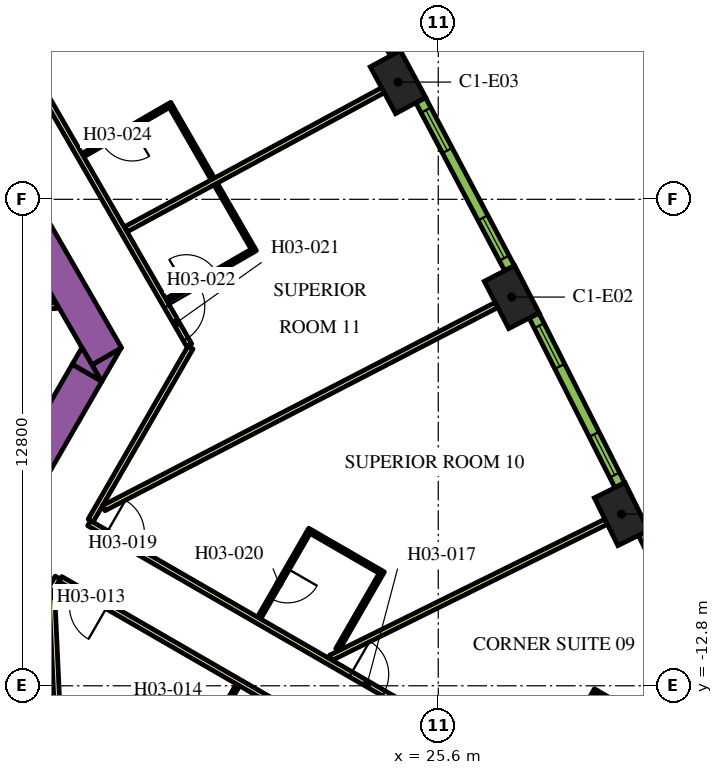
"""IFC4 building model, lengths in metres.
Left out: names, types, materials, properties, quantities, classifications, styles, units other than length and angle.
Written with IfcOpenShell. Run it as: python <this file> out.ifc"""

import sys

from ifc_helpers import new_model, si_unit, direction, frame, frame_2d, origin, origin_2d, place, context, subcontext, project, spatial, polyline, rectangle, outline, extrude, element, fill, save


model = new_model("IFC4")
c1 = context("Model", 3, precision=1e-05, world=origin(), true_north=direction((0.0, 1.0)))
c2 = subcontext(c1, "Body", "Model", "MODEL_VIEW")
j1 = project(units=[si_unit("LENGTHUNIT", "METRE"), si_unit("PLANEANGLEUNIT", "RADIAN")], contexts=[c1])
p1 = place(None, origin())
s1 = spatial("IfcSite", under=j1, at=p1, CompositionType="ELEMENT")
p2 = place(p1, origin())
s2 = spatial("IfcBuilding", under=s1, at=p2, CompositionType="ELEMENT")
p3 = place(p2, frame((0.0, 0.0, 58.8)))
s3 = spatial("IfcBuildingStorey", under=s2, at=p3, CompositionType="ELEMENT", Elevation=58.8)
for number, where, z_axis, x_axis in (
    (1, (30.421, -8.284, 0.0), (0.0, 0.0, 1.0), (-0.443, 0.897, 0.0)),
    (2, (27.533, -2.572, 0.0), (0.0, 0.0, 1.0), (-0.459, 0.888, 0.0)),
    (3, (24.54, 3.085, 0.0), (0.0, 0.0, 1.0), (-0.476, 0.88, 0.0)),
):
    element("IfcColumn", number, at=place(p3, frame(where, z_axis=z_axis, x_axis=x_axis)), inside=s3, PredefinedType="COLUMN", context=c2, shape_type="SweptSolid", body=[
        extrude(rectangle(XDim=1.4, YDim=0.9, at=origin_2d()), origin(), (0.0, 0.0, 1.0), 3.9),
    ])
p4 = place(p3, frame((6.776, 13.364, 0.0), z_axis=(0.0, 0.0, 1.0), x_axis=(0.500004177138, -0.8660229921, 0.0)))
e4 = element("IfcWall", 4, at=p4, inside=s3, PredefinedType="SOLIDWALL", context=c2, shape_type="SweptSolid", body=[
    extrude(rectangle(XDim=20.204, YDim=0.9, at=frame_2d((10.102, 0.0))), origin(), (0.0, 0.0, 1.0), 3.9),
])
p5 = place(p3, origin())
e5 = element("IfcWall", 5, at=p5, inside=s3, PredefinedType="SOLIDWALL", context=c2, shape_type="SweptSolid", body=[
    extrude(outline(polyline([(16.743, -4.8), (16.489, -4.36), (17.251, -3.92), (16.743, -4.8)])), origin(), (0.0, 0.0, 1.0), 3.9),
])
p6 = place(p3, frame((11.695, -12.644, 0.0), z_axis=(0.0, 0.0, 1.0), x_axis=(0.500010229568, 0.86601949766, 0.0)))
e6 = element("IfcWall", 6, at=p6, inside=s3, PredefinedType="SOLIDWALL", context=c2, shape_type="SweptSolid", body=[
    extrude(rectangle(XDim=9.326, YDim=0.9, at=frame_2d((4.663, 0.0))), origin(), (0.0, 0.0, 1.0), 3.9),
])
e7 = element("IfcWall", 7, at=p5, inside=s3, PredefinedType="SOLIDWALL", context=c2, shape_type="SweptSolid", body=[
    extrude(outline(polyline([(16.223, -3.9), (16.732, -4.78), (15.969, -4.34), (16.223, -3.9)])), origin(), (0.0, 0.0, 1.0), 3.9),
])
p7 = place(p3, frame((12.915, -2.8, 0.0), z_axis=(0.0, 0.0, 1.0), x_axis=(1.0, 0.0, 0.0)))
e8 = element("IfcWall", 8, at=p7, inside=s3, PredefinedType="PARTITIONING", context=c2, shape_type="SweptSolid", body=[
    extrude(rectangle(XDim=2.637, YDim=0.15, at=frame_2d((1.318, 0.0))), origin(), (0.0, 0.0, 1.0), 2.75),
])
p8 = place(p3, frame((16.412, -8.523, 0.0), z_axis=(0.0, 0.0, 1.0), x_axis=(0.866022197818, -0.500005552856, 0.0)))
e9 = element("IfcWall", 9, at=p8, inside=s3, PredefinedType="PARTITIONING", context=c2, shape_type="SweptSolid", body=[
    extrude(rectangle(XDim=16.224, YDim=0.15, at=frame_2d((8.112, 0.0))), origin(), (0.0, 0.0, 1.0), 2.75),
])
p9 = place(p8, frame((7.949, 0.0, 0.0)))
e10 = element("IfcOpeningElement", 10, at=p9, cuts=e9, PredefinedType="OPENING", context=c2, shape_type="SweptSolid", body=[
    extrude(rectangle(XDim=1.0, YDim=2.1, at=frame_2d((0.5, 1.05))), frame((0.0, 0.085, 0.0), z_axis=(0.0, -1.0, 0.0), x_axis=(1.0, 0.0, 0.0)), (0.0, 0.0, 1.0), 0.17),
])
p10 = place(p8, frame((0.526, 0.0, 0.0)))
e11 = element("IfcOpeningElement", 11, at=p10, cuts=e9, PredefinedType="OPENING", context=c2, shape_type="SweptSolid", body=[
    extrude(rectangle(XDim=1.0, YDim=2.1, at=frame_2d((0.5, 1.05))), frame((0.0, 0.085, 0.0), z_axis=(0.0, -1.0, 0.0), x_axis=(1.0, 0.0, 0.0)), (0.0, 0.0, 1.0), 0.17),
])
p11 = place(p3, frame((19.081, -3.9, 0.0), z_axis=(0.0, 0.0, 1.0), x_axis=(-0.499974327079, -0.866040225545, 0.0)))
e12 = element("IfcWall", 12, at=p11, inside=s3, PredefinedType="PARTITIONING", context=c2, shape_type="SweptSolid", body=[
    extrude(rectangle(XDim=5.258, YDim=0.15, at=frame_2d((2.629, 0.0))), origin(), (0.0, 0.0, 1.0), 2.75),
])
p12 = place(p3, frame((6.163, 18.475, 0.0), z_axis=(0.0, 0.0, 1.0), x_axis=(0.500001317485, -0.866024643133, 0.0)))
e13 = element("IfcWall", 13, at=p12, inside=s3, PredefinedType="PARTITIONING", context=c2, shape_type="SweptSolid", body=[
    extrude(rectangle(XDim=25.767, YDim=0.15, at=frame_2d((12.883, 0.0))), origin(), (0.0, 0.0, 1.0), 2.75),
])
p13 = place(p12, frame((24.586, 0.0, 0.0)))
e14 = element("IfcOpeningElement", 14, at=p13, cuts=e13, PredefinedType="OPENING", context=c2, shape_type="SweptSolid", body=[
    extrude(rectangle(XDim=1.0, YDim=2.1, at=frame_2d((0.5, 1.05))), frame((0.0, 0.085, 0.0), z_axis=(0.0, -1.0, 0.0), x_axis=(1.0, 0.0, 0.0)), (0.0, 0.0, 1.0), 0.17),
])
p14 = place(p12, frame((13.144, 0.0, 0.0)))
e15 = element("IfcOpeningElement", 15, at=p14, cuts=e13, PredefinedType="OPENING", context=c2, shape_type="SweptSolid", body=[
    extrude(rectangle(XDim=1.0, YDim=2.1, at=frame_2d((0.5, 1.05))), frame((0.0, 0.085, 0.0), z_axis=(0.0, -1.0, 0.0), x_axis=(1.0, 0.0, 0.0)), (0.0, 0.0, 1.0), 0.17),
])
p15 = place(p12, frame((11.692, 0.0, 0.0)))
e16 = element("IfcOpeningElement", 16, at=p15, cuts=e13, PredefinedType="OPENING", context=c2, shape_type="SweptSolid", body=[
    extrude(rectangle(XDim=1.0, YDim=2.1, at=frame_2d((0.5, 1.05))), frame((0.0, 0.085, 0.0), z_axis=(0.0, -1.0, 0.0), x_axis=(1.0, 0.0, 0.0)), (0.0, 0.0, 1.0), 0.17),
])
p16 = place(p12, frame((0.572, 0.0, 0.0)))
e17 = element("IfcOpeningElement", 17, at=p16, cuts=e13, PredefinedType="OPENING", context=c2, shape_type="SweptSolid", body=[
    extrude(rectangle(XDim=1.0, YDim=2.1, at=frame_2d((0.5, 1.05))), frame((0.0, 0.085, 0.0), z_axis=(0.0, -1.0, 0.0), x_axis=(1.0, 0.0, 0.0)), (0.0, 0.0, 1.0), 0.17),
])
p17 = place(p3, frame((15.587, -9.952, 0.0), z_axis=(0.0, 0.0, 1.0), x_axis=(-0.500016618951, -0.866015808616, 0.0)))
e18 = element("IfcWall", 18, at=p17, inside=s3, PredefinedType="PARTITIONING", context=c2, shape_type="SweptSolid", body=[
    extrude(rectangle(XDim=5.268, YDim=0.15, at=frame_2d((2.634, 0.0))), origin(), (0.0, 0.0, 1.0), 2.75),
])
p18 = place(p3, frame((29.638, -18.064, 0.0), z_axis=(0.0, 0.0, 1.0), x_axis=(-0.866026175601, 0.499998663172, 0.0)))
e19 = element("IfcWall", 19, at=p18, inside=s3, PredefinedType="PARTITIONING", context=c2, shape_type="SweptSolid", body=[
    extrude(rectangle(XDim=16.144, YDim=0.15, at=frame_2d((8.072, 0.0))), origin(), (0.0, 0.0, 1.0), 2.75),
])
p19 = place(p18, frame((14.714, 0.0, 0.0)))
e20 = element("IfcOpeningElement", 20, at=p19, cuts=e19, PredefinedType="OPENING", context=c2, shape_type="SweptSolid", body=[
    extrude(rectangle(XDim=1.0, YDim=2.1, at=frame_2d((0.5, 1.05))), frame((0.0, 0.085, 0.0), z_axis=(0.0, -1.0, 0.0), x_axis=(1.0, 0.0, 0.0)), (0.0, 0.0, 1.0), 0.17),
])
p20 = place(p18, frame((7.275, 0.0, 0.0)))
e21 = element("IfcOpeningElement", 21, at=p20, cuts=e19, PredefinedType="OPENING", context=c2, shape_type="SweptSolid", body=[
    extrude(rectangle(XDim=1.0, YDim=2.1, at=frame_2d((0.5, 1.05))), frame((0.0, 0.085, 0.0), z_axis=(0.0, -1.0, 0.0), x_axis=(1.0, 0.0, 0.0)), (0.0, 0.0, 1.0), 0.17),
])
p21 = place(p3, frame((15.973, -22.109, 0.0), z_axis=(0.0, 0.0, 1.0), x_axis=(-0.046191717129, 0.998932592955, 0.0)))
e22 = element("IfcWall", 22, at=p21, inside=s3, PredefinedType="PARTITIONING", context=c2, shape_type="SweptSolid", body=[
    extrude(rectangle(XDim=11.638, YDim=0.15, at=frame_2d((5.819, 0.0))), origin(), (0.0, 0.0, 1.0), 2.75),
])
p22 = place(p3, frame((27.134, -2.779, 0.0), z_axis=(0.0, 0.0, 1.0), x_axis=(-0.8882049501, -0.459447457951, 0.0)))
e23 = element("IfcWall", 23, at=p22, inside=s3, PredefinedType="PARTITIONING", context=c2, shape_type="SweptSolid", body=[
    extrude(rectangle(XDim=11.638, YDim=0.15, at=frame_2d((5.819, 0.0))), origin(), (0.0, 0.0, 1.0), 2.75),
])
p23 = place(p3, frame((24.145, 2.871, 0.0), z_axis=(0.0, 0.0, 1.0), x_axis=(-0.879551725039, -0.475803281809, 0.0)))
e24 = element("IfcWall", 24, at=p23, inside=s3, PredefinedType="PARTITIONING", context=c2, shape_type="SweptSolid", body=[
    extrude(rectangle(XDim=7.688, YDim=0.15, at=frame_2d((3.844, 0.0))), origin(), (0.0, 0.0, 1.0), 2.75),
])
p24 = place(p3, frame((30.018, -8.483, 0.0), z_axis=(0.0, 0.0, 1.0), x_axis=(-0.896544505264, -0.44295366584, 0.0)))
e25 = element("IfcWall", 25, at=p24, inside=s3, PredefinedType="PARTITIONING", context=c2, shape_type="SweptSolid", body=[
    extrude(rectangle(XDim=8.079, YDim=0.15, at=frame_2d((4.04, 0.0))), origin(), (0.0, 0.0, 1.0), 2.75),
])
p25 = place(p3, frame((20.33, -12.777, 0.0), z_axis=(0.0, 0.0, 1.0), x_axis=(-0.500006934395, -0.866021400173, 0.0)))
e26 = element("IfcWall", 26, at=p25, inside=s3, PredefinedType="PARTITIONING", context=c2, shape_type="SweptSolid", body=[
    extrude(rectangle(XDim=2.6, YDim=0.1, at=frame_2d((1.3, 0.0))), origin(), (0.0, 0.0, 1.0), 2.75),
])
p26 = place(p25, frame((0.6, 0.0, 0.0)))
e27 = element("IfcOpeningElement", 27, at=p26, cuts=e26, PredefinedType="OPENING", context=c2, shape_type="SweptSolid", body=[
    extrude(rectangle(XDim=0.9, YDim=2.1, at=frame_2d((0.45, 1.05))), frame((0.0, 0.06, 0.0), z_axis=(0.0, -1.0, 0.0), x_axis=(1.0, 0.0, 0.0)), (0.0, 0.0, 1.0), 0.12),
])
p27 = place(p3, frame((29.752, -12.905, 0.0), z_axis=(0.0, 0.0, 1.0), x_axis=(-0.500049511043, -0.865996816683, 0.0)))
e28 = element("IfcWall", 28, at=p27, inside=s3, PredefinedType="PARTITIONING", context=c2, shape_type="SweptSolid", body=[
    extrude(rectangle(XDim=2.8, YDim=0.1, at=frame_2d((1.4, 0.0))), origin(), (0.0, 0.0, 1.0), 2.75),
])
p28 = place(p27, frame((1.3, 0.0, 0.0)))
e29 = element("IfcOpeningElement", 29, at=p28, cuts=e28, PredefinedType="OPENING", context=c2, shape_type="SweptSolid", body=[
    extrude(rectangle(XDim=0.9, YDim=2.1, at=frame_2d((0.45, 1.05))), frame((0.0, 0.06, 0.0), z_axis=(0.0, -1.0, 0.0), x_axis=(1.0, 0.0, 0.0)), (0.0, 0.0, 1.0), 0.12),
])
p29 = place(p3, frame((29.771, -12.973, 0.0), z_axis=(0.0, 0.0, 1.0), x_axis=(0.865980596518, -0.500077600433, 0.0)))
e30 = element("IfcWall", 30, at=p29, inside=s3, PredefinedType="PARTITIONING", context=c2, shape_type="SweptSolid", body=[
    extrude(rectangle(XDim=2.4, YDim=0.1, at=frame_2d((1.2, 0.0))), origin(), (0.0, 0.0, 1.0), 2.75),
])
p30 = place(p3, frame((22.234, -8.68, 0.0), z_axis=(0.0, 0.0, 1.0), x_axis=(-0.50000943426, -0.866019956843, 0.0)))
e31 = element("IfcWall", 31, at=p30, inside=s3, PredefinedType="PARTITIONING", context=c2, shape_type="SweptSolid", body=[
    extrude(rectangle(XDim=2.7, YDim=0.1, at=frame_2d((1.35, 0.0))), origin(), (0.0, 0.0, 1.0), 2.75),
])
p31 = place(p30, frame((1.2, 0.0, 0.0)))
e32 = element("IfcOpeningElement", 32, at=p31, cuts=e31, PredefinedType="OPENING", context=c2, shape_type="SweptSolid", body=[
    extrude(rectangle(XDim=0.9, YDim=2.1, at=frame_2d((0.45, 1.05))), frame((0.0, 0.06, 0.0), z_axis=(0.0, -1.0, 0.0), x_axis=(1.0, 0.0, 0.0)), (0.0, 0.0, 1.0), 0.12),
])
p32 = place(p3, frame((22.252, -8.748, 0.0), z_axis=(0.0, 0.0, 1.0), x_axis=(0.866009402589, -0.500027713859, 0.0)))
e33 = element("IfcWall", 33, at=p32, inside=s3, PredefinedType="PARTITIONING", context=c2, shape_type="SweptSolid", body=[
    extrude(rectangle(XDim=2.1, YDim=0.1, at=frame_2d((1.05, 0.0))), origin(), (0.0, 0.0, 1.0), 2.75),
])
p33 = place(p3, frame((22.944, -11.85, 0.0), z_axis=(0.0, 0.0, 1.0), x_axis=(0.499940577336, 0.866059708757, 0.0)))
e34 = element("IfcWall", 34, at=p33, inside=s3, PredefinedType="PARTITIONING", context=c2, shape_type="SweptSolid", body=[
    extrude(rectangle(XDim=2.39, YDim=0.1, at=frame_2d((1.195, 0.0))), origin(), (0.0, 0.0, 1.0), 2.75),
])
p34 = place(p3, frame((18.451, -2.657, 0.0), z_axis=(0.0, 0.0, 1.0), x_axis=(0.86599734893, 0.500048589285, 0.0)))
e35 = element("IfcWall", 35, at=p34, inside=s3, PredefinedType="PARTITIONING", context=c2, shape_type="SweptSolid", body=[
    extrude(rectangle(XDim=2.7, YDim=0.1, at=frame_2d((1.35, 0.0))), origin(), (0.0, 0.0, 1.0), 2.75),
])
p35 = place(p34, frame((0.6, 0.0, 0.0)))
e36 = element("IfcOpeningElement", 36, at=p35, cuts=e35, PredefinedType="OPENING", context=c2, shape_type="SweptSolid", body=[
    extrude(rectangle(XDim=0.9, YDim=2.1, at=frame_2d((0.45, 1.05))), frame((0.0, 0.06, 0.0), z_axis=(0.0, -1.0, 0.0), x_axis=(1.0, 0.0, 0.0)), (0.0, 0.0, 1.0), 0.12),
])
p36 = place(p3, frame((20.716, -1.281, 0.0), z_axis=(0.0, 0.0, 1.0), x_axis=(-0.499969367985, 0.866043088465, 0.0)))
e37 = element("IfcWall", 37, at=p36, inside=s3, PredefinedType="PARTITIONING", context=c2, shape_type="SweptSolid", body=[
    extrude(rectangle(XDim=1.94, YDim=0.1, at=frame_2d((0.97, 0.0))), origin(), (0.0, 0.0, 1.0), 2.75),
])
p37 = place(p3, frame((18.586, 2.509, 0.0), z_axis=(0.0, 0.0, 1.0), x_axis=(-0.866059108428, -0.4999416173, 0.0)))
e38 = element("IfcWall", 38, at=p37, inside=s3, PredefinedType="PARTITIONING", context=c2, shape_type="SweptSolid", body=[
    extrude(rectangle(XDim=2.7, YDim=0.1, at=frame_2d((1.35, 0.0))), origin(), (0.0, 0.0, 1.0), 2.75),
])
p38 = place(p37, frame((1.2, 0.0, 0.0)))
e39 = element("IfcOpeningElement", 39, at=p38, cuts=e38, PredefinedType="OPENING", context=c2, shape_type="SweptSolid", body=[
    extrude(rectangle(XDim=0.9, YDim=2.1, at=frame_2d((0.45, 1.05))), frame((0.0, 0.06, 0.0), z_axis=(0.0, -1.0, 0.0), x_axis=(1.0, 0.0, 0.0)), (0.0, 0.0, 1.0), 0.12),
])
p39 = place(p3, frame((18.567, 2.441, 0.0), z_axis=(0.0, 0.0, 1.0), x_axis=(0.499946605688, -0.86605622881, 0.0)))
e40 = element("IfcWall", 40, at=p39, inside=s3, PredefinedType="PARTITIONING", context=c2, shape_type="SweptSolid", body=[
    extrude(rectangle(XDim=2.2, YDim=0.1, at=frame_2d((1.1, 0.0))), origin(), (0.0, 0.0, 1.0), 2.75),
])
p40 = place(p3, frame((33.176, -13.29, 0.0), z_axis=(0.0, 0.0, 1.0), x_axis=(-0.434664499056, 0.900592456808, 0.0)))
e41 = element("IfcWall", 41, at=p40, inside=s3, PredefinedType="SOLIDWALL", context=c2, shape_type="SweptSolid", body=[
    extrude(rectangle(XDim=5.006, YDim=0.29, at=frame_2d((2.503, 0.0))), origin(), (0.0, 0.0, 1.0), 3.65),
])
p41 = place(p40, frame((0.265, 0.0, 0.9)))
e42 = element("IfcOpeningElement", 42, at=p41, cuts=e41, PredefinedType="OPENING", context=c2, shape_type="SweptSolid", body=[
    extrude(rectangle(XDim=1.2, YDim=2.15, at=frame_2d((0.6, 1.075))), frame((0.0, 0.155, 0.0), z_axis=(0.0, -1.0, 0.0), x_axis=(1.0, 0.0, 0.0)), (0.0, 0.0, 1.0), 0.31),
])
p42 = place(p40, frame((3.496, 0.0, 0.9)))
e43 = element("IfcOpeningElement", 43, at=p42, cuts=e41, PredefinedType="OPENING", context=c2, shape_type="SweptSolid", body=[
    extrude(rectangle(XDim=1.2, YDim=2.15, at=frame_2d((0.6, 1.075))), frame((0.0, 0.155, 0.0), z_axis=(0.0, -1.0, 0.0), x_axis=(1.0, 0.0, 0.0)), (0.0, 0.0, 1.0), 0.31),
])
p43 = place(p3, frame((30.377, -7.521, 0.0), z_axis=(0.0, 0.0, 1.0), x_axis=(-0.451233929645, 0.892405704115, 0.0)))
e44 = element("IfcWall", 44, at=p43, inside=s3, PredefinedType="SOLIDWALL", context=c2, shape_type="SweptSolid", body=[
    extrude(rectangle(XDim=4.998, YDim=0.29, at=frame_2d((2.499, 0.0))), origin(), (0.0, 0.0, 1.0), 3.65),
])
p44 = place(p43, frame((0.297, 0.0, 0.9)))
e45 = element("IfcOpeningElement", 45, at=p44, cuts=e44, PredefinedType="OPENING", context=c2, shape_type="SweptSolid", body=[
    extrude(rectangle(XDim=1.2, YDim=2.15, at=frame_2d((0.6, 1.075))), frame((0.0, 0.155, 0.0), z_axis=(0.0, -1.0, 0.0), x_axis=(1.0, 0.0, 0.0)), (0.0, 0.0, 1.0), 0.31),
])
p45 = place(p43, frame((3.501, 0.0, 0.9)))
e46 = element("IfcOpeningElement", 46, at=p45, cuts=e44, PredefinedType="OPENING", context=c2, shape_type="SweptSolid", body=[
    extrude(rectangle(XDim=1.2, YDim=2.15, at=frame_2d((0.6, 1.075))), frame((0.0, 0.155, 0.0), z_axis=(0.0, -1.0, 0.0), x_axis=(1.0, 0.0, 0.0)), (0.0, 0.0, 1.0), 0.31),
])
p46 = place(p3, frame((27.475, -1.81, 0.0), z_axis=(0.0, 0.0, 1.0), x_axis=(-0.467629620899, 0.883924509026, 0.0)))
e47 = element("IfcWall", 47, at=p46, inside=s3, PredefinedType="SOLIDWALL", context=c2, shape_type="SweptSolid", body=[
    extrude(rectangle(XDim=4.998, YDim=0.29, at=frame_2d((2.499, 0.0))), origin(), (0.0, 0.0, 1.0), 3.65),
])
p47 = place(p46, frame((0.297, 0.0, 0.9)))
e48 = element("IfcOpeningElement", 48, at=p47, cuts=e47, PredefinedType="OPENING", context=c2, shape_type="SweptSolid", body=[
    extrude(rectangle(XDim=1.2, YDim=2.15, at=frame_2d((0.6, 1.075))), frame((0.0, 0.155, 0.0), z_axis=(0.0, -1.0, 0.0), x_axis=(1.0, 0.0, 0.0)), (0.0, 0.0, 1.0), 0.31),
])
p48 = place(p46, frame((3.501, 0.0, 0.9)))
e49 = element("IfcOpeningElement", 49, at=p48, cuts=e47, PredefinedType="OPENING", context=c2, shape_type="SweptSolid", body=[
    extrude(rectangle(XDim=1.2, YDim=2.15, at=frame_2d((0.6, 1.075))), frame((0.0, 0.155, 0.0), z_axis=(0.0, -1.0, 0.0), x_axis=(1.0, 0.0, 0.0)), (0.0, 0.0, 1.0), 0.31),
])
p49 = place(p3, frame((24.468, 3.846, 0.0), z_axis=(0.0, 0.0, 1.0), x_axis=(-0.483912572871, 0.875116347589, 0.0)))
e50 = element("IfcWall", 50, at=p49, inside=s3, PredefinedType="SOLIDWALL", context=c2, shape_type="SweptSolid", body=[
    extrude(rectangle(XDim=4.998, YDim=0.29, at=frame_2d((2.499, 0.0))), origin(), (0.0, 0.0, 1.0), 3.65),
])
p50 = place(p49, frame((0.297, 0.0, 0.9)))
e51 = element("IfcOpeningElement", 51, at=p50, cuts=e50, PredefinedType="OPENING", context=c2, shape_type="SweptSolid", body=[
    extrude(rectangle(XDim=1.2, YDim=2.15, at=frame_2d((0.6, 1.075))), frame((0.0, 0.155, 0.0), z_axis=(0.0, -1.0, 0.0), x_axis=(1.0, 0.0, 0.0)), (0.0, 0.0, 1.0), 0.31),
])
p51 = place(p49, frame((3.501, 0.0, 0.9)))
e52 = element("IfcOpeningElement", 52, at=p51, cuts=e50, PredefinedType="OPENING", context=c2, shape_type="SweptSolid", body=[
    extrude(rectangle(XDim=1.2, YDim=2.15, at=frame_2d((0.6, 1.075))), frame((0.0, 0.155, 0.0), z_axis=(0.0, -1.0, 0.0), x_axis=(1.0, 0.0, 0.0)), (0.0, 0.0, 1.0), 0.31),
])
p52 = place(p19, origin())
e53 = element("IfcDoor", 53, at=p52, inside=s3, OperationType="SINGLE_SWING_RIGHT", PredefinedType="DOOR", context=c2, shape_type="SweptSolid", body=[
    extrude(rectangle(XDim=1.0, YDim=2.1, at=frame_2d((0.5, 1.05))), frame((0.0, 0.025, 0.0), z_axis=(0.0, -1.0, 0.0), x_axis=(1.0, 0.0, 0.0)), (0.0, 0.0, 1.0), 0.05),
])
fill(e20, e53)
p53 = place(p9, origin())
e54 = element("IfcDoor", 54, at=p53, inside=s3, OperationType="SINGLE_SWING_LEFT", PredefinedType="DOOR", context=c2, shape_type="SweptSolid", body=[
    extrude(rectangle(XDim=1.0, YDim=2.1, at=frame_2d((0.5, 1.05))), frame((0.0, 0.025, 0.0), z_axis=(0.0, -1.0, 0.0), x_axis=(1.0, 0.0, 0.0)), (0.0, 0.0, 1.0), 0.05),
])
fill(e10, e54)
p54 = place(p10, origin())
e55 = element("IfcDoor", 55, at=p54, inside=s3, OperationType="SINGLE_SWING_LEFT", PredefinedType="DOOR", context=c2, shape_type="SweptSolid", body=[
    extrude(rectangle(XDim=1.0, YDim=2.1, at=frame_2d((0.5, 1.05))), frame((0.0, 0.025, 0.0), z_axis=(0.0, -1.0, 0.0), x_axis=(1.0, 0.0, 0.0)), (0.0, 0.0, 1.0), 0.05),
])
fill(e11, e55)
p55 = place(p31, origin())
e56 = element("IfcDoor", 56, at=p55, inside=s3, OperationType="SINGLE_SWING_LEFT", PredefinedType="DOOR", context=c2, shape_type="SweptSolid", body=[
    extrude(rectangle(XDim=0.9, YDim=2.1, at=frame_2d((0.45, 1.05))), frame((0.0, 0.025, 0.0), z_axis=(0.0, -1.0, 0.0), x_axis=(1.0, 0.0, 0.0)), (0.0, 0.0, 1.0), 0.05),
])
fill(e32, e56)
p56 = place(p13, origin())
e57 = element("IfcDoor", 57, at=p56, inside=s3, OperationType="SINGLE_SWING_RIGHT", PredefinedType="DOOR", context=c2, shape_type="SweptSolid", body=[
    extrude(rectangle(XDim=1.0, YDim=2.1, at=frame_2d((0.5, 1.05))), frame((0.0, 0.025, 0.0), z_axis=(0.0, -1.0, 0.0), x_axis=(1.0, 0.0, 0.0)), (0.0, 0.0, 1.0), 0.05),
])
fill(e14, e57)
p57 = place(p35, origin())
e58 = element("IfcDoor", 58, at=p57, inside=s3, OperationType="SINGLE_SWING_LEFT", PredefinedType="DOOR", context=c2, shape_type="SweptSolid", body=[
    extrude(rectangle(XDim=0.9, YDim=2.1, at=frame_2d((0.45, 1.05))), frame((0.0, 0.025, 0.0), z_axis=(0.0, -1.0, 0.0), x_axis=(1.0, 0.0, 0.0)), (0.0, 0.0, 1.0), 0.05),
])
fill(e36, e58)
p58 = place(p38, origin())
e59 = element("IfcDoor", 59, at=p58, inside=s3, OperationType="SINGLE_SWING_RIGHT", PredefinedType="DOOR", context=c2, shape_type="SweptSolid", body=[
    extrude(rectangle(XDim=0.9, YDim=2.1, at=frame_2d((0.45, 1.05))), frame((0.0, 0.025, 0.0), z_axis=(0.0, -1.0, 0.0), x_axis=(1.0, 0.0, 0.0)), (0.0, 0.0, 1.0), 0.05),
])
fill(e39, e59)
p59 = place(p44, origin())
e60 = element("IfcWindow", 60, at=p59, inside=s3, PartitioningType="DOUBLE_PANEL_VERTICAL", PredefinedType="WINDOW", context=c2, shape_type="SweptSolid", body=[
    extrude(rectangle(XDim=1.2, YDim=2.15, at=frame_2d((0.6, 1.075))), frame((0.0, 0.015, 0.0), z_axis=(0.0, -1.0, 0.0), x_axis=(1.0, 0.0, 0.0)), (0.0, 0.0, 1.0), 0.06),
])
fill(e45, e60)
p60 = place(p45, origin())
e61 = element("IfcWindow", 61, at=p60, inside=s3, PartitioningType="DOUBLE_PANEL_VERTICAL", PredefinedType="WINDOW", context=c2, shape_type="SweptSolid", body=[
    extrude(rectangle(XDim=1.2, YDim=2.15, at=frame_2d((0.6, 1.075))), frame((0.0, 0.015, 0.0), z_axis=(0.0, -1.0, 0.0), x_axis=(1.0, 0.0, 0.0)), (0.0, 0.0, 1.0), 0.06),
])
fill(e46, e61)
p61 = place(p47, origin())
e62 = element("IfcWindow", 62, at=p61, inside=s3, PartitioningType="DOUBLE_PANEL_VERTICAL", PredefinedType="WINDOW", context=c2, shape_type="SweptSolid", body=[
    extrude(rectangle(XDim=1.2, YDim=2.15, at=frame_2d((0.6, 1.075))), frame((0.0, 0.015, 0.0), z_axis=(0.0, -1.0, 0.0), x_axis=(1.0, 0.0, 0.0)), (0.0, 0.0, 1.0), 0.06),
])
fill(e48, e62)
p62 = place(p48, origin())
e63 = element("IfcWindow", 63, at=p62, inside=s3, PartitioningType="DOUBLE_PANEL_VERTICAL", PredefinedType="WINDOW", context=c2, shape_type="SweptSolid", body=[
    extrude(rectangle(XDim=1.2, YDim=2.15, at=frame_2d((0.6, 1.075))), frame((0.0, 0.015, 0.0), z_axis=(0.0, -1.0, 0.0), x_axis=(1.0, 0.0, 0.0)), (0.0, 0.0, 1.0), 0.06),
])
fill(e49, e63)
save(model, sys.argv[1])
